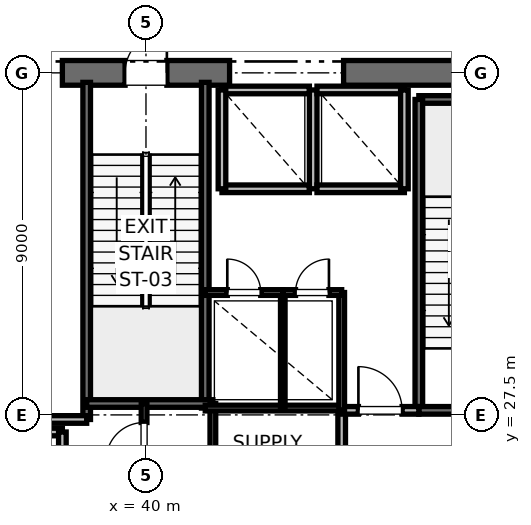
"""IFC4 building model, lengths in metres.
Left out: names, types, materials, properties, quantities, classifications, styles, units other than length and angle.
Written with IfcOpenShell. Run it as: python <this file> out.ifc"""

import sys

from ifc_helpers import new_model, si_unit, direction, frame, frame_2d, origin, place, context, subcontext, project, spatial, rectangle, extrude, element, fill, save


model = new_model("IFC4")
c1 = context("Model", 3, precision=1e-05, world=origin(), true_north=direction((0.0, 1.0)))
c2 = subcontext(c1, "Body", "Model", "MODEL_VIEW")
j1 = project(units=[si_unit("LENGTHUNIT", "METRE"), si_unit("PLANEANGLEUNIT", "RADIAN")], contexts=[c1])
p1 = place(None, origin())
s1 = spatial("IfcSite", under=j1, at=p1, CompositionType="ELEMENT")
p2 = place(p1, origin())
s2 = spatial("IfcBuilding", under=s1, at=p2, CompositionType="ELEMENT")
p3 = place(p2, frame((0.0, 0.0, 11.2)))
s3 = spatial("IfcBuildingStorey", under=s2, at=p3, CompositionType="ELEMENT", Elevation=11.2)
p4 = place(p3, frame((37.8, 36.5, 0.0), z_axis=(0.0, 0.0, 1.0), x_axis=(1.0, 0.0, 0.0)))
e1 = element("IfcWall", 1, at=p4, inside=s3, PredefinedType="SHEAR", context=c2, shape_type="SweptSolid", body=[
    extrude(rectangle(XDim=4.4, YDim=0.65, at=frame_2d((2.2, 0.0))), origin(), (0.0, 0.0, 1.0), 4.92),
])
p5 = place(p4, frame((1.65, 0.0, 0.0)))
e2 = element("IfcOpeningElement", 2, at=p5, cuts=e1, PredefinedType="OPENING", context=c2, shape_type="SweptSolid", body=[
    extrude(rectangle(XDim=1.1, YDim=2.15, at=frame_2d((0.55, 1.075))), frame((0.0, 0.325, 0.0), z_axis=(0.0, -1.0, 0.0), x_axis=(1.0, 0.0, 0.0)), (0.0, 0.0, 1.0), 0.65),
])
p6 = place(p3, frame((45.2, 36.5, 0.0), z_axis=(0.0, 0.0, 1.0), x_axis=(1.0, 0.0, 0.0)))
e3 = element("IfcWall", 3, at=p6, inside=s3, PredefinedType="SHEAR", context=c2, shape_type="SweptSolid", body=[
    extrude(rectangle(XDim=5.8, YDim=0.65, at=frame_2d((2.9, 0.0))), origin(), (0.0, 0.0, 1.0), 4.92),
])
p7 = place(p3, frame((47.18, 35.8, 0.0), z_axis=(0.0, 0.0, 1.0), x_axis=(1.0, 0.0, 0.0)))
e4 = element("IfcWall", 4, at=p7, inside=s3, PredefinedType="SOLIDWALL", context=c2, shape_type="SweptSolid", body=[
    extrude(rectangle(XDim=3.12, YDim=0.2, at=frame_2d((1.56, 0.0))), origin(), (0.0, 0.0, 1.0), 4.92),
])
p8 = place(p3, frame((47.18, 27.62, 0.0), z_axis=(0.0, 0.0, 1.0), x_axis=(0.0, 1.0, 0.0)))
e5 = element("IfcWall", 5, at=p8, inside=s3, PredefinedType="SOLIDWALL", context=c2, shape_type="SweptSolid", body=[
    extrude(rectangle(XDim=8.18, YDim=0.2, at=frame_2d((4.09, 0.0))), origin(), (0.0, 0.0, 1.0), 4.92),
])
p9 = place(p3, frame((47.18, 27.62, 0.0), z_axis=(0.0, 0.0, 1.0), x_axis=(1.0, 0.0, 0.0)))
e6 = element("IfcWall", 6, at=p9, inside=s3, PredefinedType="SOLIDWALL", context=c2, shape_type="SweptSolid", body=[
    extrude(rectangle(XDim=3.12, YDim=0.2, at=frame_2d((1.56, 0.0))), origin(), (0.0, 0.0, 1.0), 4.92),
])
p10 = place(p9, frame((1.01, 0.0, 0.0)))
e7 = element("IfcOpeningElement", 7, at=p10, cuts=e6, PredefinedType="OPENING", context=c2, shape_type="SweptSolid", body=[
    extrude(rectangle(XDim=1.1, YDim=2.15, at=frame_2d((0.55, 1.075))), frame((0.0, 0.1, 0.0), z_axis=(0.0, -1.0, 0.0), x_axis=(1.0, 0.0, 0.0)), (0.0, 0.0, 1.0), 0.2),
])
p11 = place(p3, frame((38.44, 27.38, 0.0), z_axis=(0.0, 0.0, 1.0), x_axis=(0.0, 1.0, 0.0)))
e8 = element("IfcWall", 8, at=p11, inside=s3, PredefinedType="SOLIDWALL", context=c2, shape_type="SweptSolid", body=[
    extrude(rectangle(XDim=8.87, YDim=0.2, at=frame_2d((4.435, 0.0))), origin(), (0.0, 0.0, 1.0), 4.92),
])
p12 = place(p3, frame((41.56, 27.68, 0.0), z_axis=(0.0, 0.0, 1.0), x_axis=(0.0, 1.0, 0.0)))
e9 = element("IfcWall", 9, at=p12, inside=s3, PredefinedType="SOLIDWALL", context=c2, shape_type="SweptSolid", body=[
    extrude(rectangle(XDim=8.57, YDim=0.2, at=frame_2d((4.285, 0.0))), origin(), (0.0, 0.0, 1.0), 4.92),
])
p13 = place(p3, frame((38.44, 27.8, 0.0), z_axis=(0.0, 0.0, 1.0), x_axis=(1.0, 0.0, 0.0)))
e10 = element("IfcWall", 10, at=p13, inside=s3, PredefinedType="SOLIDWALL", context=c2, shape_type="SweptSolid", body=[
    extrude(rectangle(XDim=3.32, YDim=0.2, at=frame_2d((1.66, 0.0))), origin(), (0.0, 0.0, 1.0), 4.92),
])
p14 = place(p3, frame((32.82, 27.38, 0.0), z_axis=(0.0, 0.0, 1.0), x_axis=(1.0, 0.0, 0.0)))
e11 = element("IfcWall", 11, at=p14, inside=s3, PredefinedType="PARTITIONING", context=c2, shape_type="SweptSolid", body=[
    extrude(rectangle(XDim=5.62, YDim=0.2, at=frame_2d((2.81, 0.0))), origin(), (0.0, 0.0, 1.0), 4.92),
])
p15 = place(p3, frame((45.15, 24.25, 0.0), z_axis=(0.0, 0.0, 1.0), x_axis=(0.0, 1.0, 0.0)))
e12 = element("IfcWall", 12, at=p15, inside=s3, PredefinedType="PARTITIONING", context=c2, shape_type="SweptSolid", body=[
    extrude(rectangle(XDim=3.37, YDim=0.2, at=frame_2d((1.685, 0.0))), origin(), (0.0, 0.0, 1.0), 4.92),
])
p16 = place(p3, frame((45.15, 27.62, 0.0), z_axis=(0.0, 0.0, 1.0), x_axis=(1.0, 0.0, 0.0)))
e13 = element("IfcWall", 13, at=p16, inside=s3, PredefinedType="PARTITIONING", context=c2, shape_type="SweptSolid", body=[
    extrude(rectangle(XDim=2.03, YDim=0.2, at=frame_2d((1.015, 0.0))), origin(), (0.0, 0.0, 1.0), 4.92),
])
p17 = place(p16, frame((0.44, 0.0, 0.0)))
e14 = element("IfcOpeningElement", 14, at=p17, cuts=e13, PredefinedType="OPENING", context=c2, shape_type="SweptSolid", body=[
    extrude(rectangle(XDim=1.15, YDim=2.2, at=frame_2d((0.575, 1.1))), frame((0.0, 0.1, 0.0), z_axis=(0.0, -1.0, 0.0), x_axis=(1.0, 0.0, 0.0)), (0.0, 0.0, 1.0), 0.2),
])
p18 = place(p3, frame((37.8, 27.05, 0.0), z_axis=(0.0, 0.0, 1.0), x_axis=(-1.0, 0.0, 0.0)))
e15 = element("IfcWall", 15, at=p18, inside=s3, PredefinedType="SOLIDWALL", context=c2, shape_type="SweptSolid", body=[
    extrude(rectangle(XDim=2.3, YDim=0.2, at=frame_2d((1.15, 0.0))), origin(), (0.0, 0.0, 1.0), 4.92),
])
p19 = place(p3, frame((37.8, 24.45, 0.0), z_axis=(0.0, 0.0, 1.0), x_axis=(0.0, 1.0, 0.0)))
e16 = element("IfcWall", 16, at=p19, inside=s3, PredefinedType="SOLIDWALL", context=c2, shape_type="SweptSolid", body=[
    extrude(rectangle(XDim=2.6, YDim=0.2, at=frame_2d((1.3, 0.0))), origin(), (0.0, 0.0, 1.0), 4.92),
])
p20 = place(p3, frame((42.0, 33.45, 0.0), z_axis=(0.0, 0.0, 1.0), x_axis=(1.0, 0.0, 0.0)))
e17 = element("IfcWall", 17, at=p20, inside=s3, PredefinedType="SOLIDWALL", context=c2, shape_type="SweptSolid", body=[
    extrude(rectangle(XDim=2.3, YDim=0.2, at=frame_2d((1.15, 0.0))), origin(), (0.0, 0.0, 1.0), 4.92),
])
p21 = place(p3, frame((44.3, 36.05, 0.0), z_axis=(0.0, 0.0, 1.0), x_axis=(-1.0, 0.0, 0.0)))
e18 = element("IfcWall", 18, at=p21, inside=s3, PredefinedType="SOLIDWALL", context=c2, shape_type="SweptSolid", body=[
    extrude(rectangle(XDim=2.3, YDim=0.2, at=frame_2d((1.15, 0.0))), origin(), (0.0, 0.0, 1.0), 3.7),
])
for number, where, z_axis, x_axis in (
    (19, (42.0, 36.05, 0.0), (0.0, 0.0, 1.0), (0.0, -1.0, 0.0)),
    (20, (44.4, 33.45, 0.0), (0.0, 0.0, 1.0), (0.0, 1.0, 0.0)),
):
    element("IfcWall", number, at=place(p3, frame(where, z_axis=z_axis, x_axis=x_axis)), inside=s3, PredefinedType="SOLIDWALL", context=c2, shape_type="SweptSolid", body=[
        extrude(rectangle(XDim=2.6, YDim=0.2, at=frame_2d((1.3, 0.0))), origin(), (0.0, 0.0, 1.0), 3.7),
    ])
p22 = place(p3, frame((44.5, 33.45, 0.0), z_axis=(0.0, 0.0, 1.0), x_axis=(1.0, 0.0, 0.0)))
e21 = element("IfcWall", 21, at=p22, inside=s3, PredefinedType="SOLIDWALL", context=c2, shape_type="SweptSolid", body=[
    extrude(rectangle(XDim=2.3, YDim=0.2, at=frame_2d((1.15, 0.0))), origin(), (0.0, 0.0, 1.0), 4.92),
])
p23 = place(p3, frame((46.8, 36.05, 0.0), z_axis=(0.0, 0.0, 1.0), x_axis=(-1.0, 0.0, 0.0)))
e22 = element("IfcWall", 22, at=p23, inside=s3, PredefinedType="SOLIDWALL", context=c2, shape_type="SweptSolid", body=[
    extrude(rectangle(XDim=2.3, YDim=0.2, at=frame_2d((1.15, 0.0))), origin(), (0.0, 0.0, 1.0), 3.7),
])
p24 = place(p3, frame((46.8, 33.45, 0.0), z_axis=(0.0, 0.0, 1.0), x_axis=(0.0, 1.0, 0.0)))
e23 = element("IfcWall", 23, at=p24, inside=s3, PredefinedType="SOLIDWALL", context=c2, shape_type="SweptSolid", body=[
    extrude(rectangle(XDim=2.6, YDim=0.2, at=frame_2d((1.3, 0.0))), origin(), (0.0, 0.0, 1.0), 4.92),
])
p25 = place(p3, frame((41.76, 23.8, 0.0), z_axis=(0.0, 0.0, 1.0), x_axis=(0.0, 1.0, 0.0)))
e24 = element("IfcWall", 24, at=p25, inside=s3, PredefinedType="PARTITIONING", context=c2, shape_type="SweptSolid", body=[
    extrude(rectangle(XDim=4.0, YDim=0.15, at=frame_2d((2.0, 0.0))), origin(), (0.0, 0.0, 1.0), 2.85),
])
p26 = place(p3, frame((39.95, 25.8, 0.0), z_axis=(0.0, 0.0, 1.0), x_axis=(0.0, 1.0, 0.0)))
e25 = element("IfcWall", 25, at=p26, inside=s3, PredefinedType="PARTITIONING", context=c2, shape_type="SweptSolid", body=[
    extrude(rectangle(XDim=2.0, YDim=0.15, at=frame_2d((1.0, 0.0))), origin(), (0.0, 0.0, 1.0), 2.85),
])
p27 = place(p26, frame((0.5, 0.0, 0.0)))
e26 = element("IfcOpeningElement", 26, at=p27, cuts=e25, PredefinedType="OPENING", context=c2, shape_type="SweptSolid", body=[
    extrude(rectangle(XDim=1.0, YDim=2.15, at=frame_2d((0.5, 1.075))), frame((0.0, 0.075, 0.0), z_axis=(0.0, -1.0, 0.0), x_axis=(1.0, 0.0, 0.0)), (0.0, 0.0, 1.0), 0.15),
])
p28 = place(p3, frame((41.56, 27.68, 0.0), z_axis=(0.0, 0.0, 1.0), x_axis=(1.0, 0.0, 0.0)))
e27 = element("IfcWall", 27, at=p28, inside=s3, PredefinedType="PARTITIONING", context=c2, shape_type="SweptSolid", body=[
    extrude(rectangle(XDim=3.59, YDim=0.15, at=frame_2d((1.795, 0.0))), origin(), (0.0, 0.0, 1.0), 2.85),
])
p29 = place(p3, frame((45.15, 27.62, 0.0), z_axis=(0.0, 0.0, 1.0), x_axis=(0.0, 1.0, 0.0)))
e28 = element("IfcWall", 28, at=p29, inside=s3, PredefinedType="PARTITIONING", context=c2, shape_type="SweptSolid", body=[
    extrude(rectangle(XDim=3.1, YDim=0.15, at=frame_2d((1.55, 0.0))), origin(), (0.0, 0.0, 1.0), 2.85),
])
p30 = place(p3, frame((43.6, 27.68, 0.0), z_axis=(0.0, 0.0, 1.0), x_axis=(0.0, 1.0, 0.0)))
e29 = element("IfcWall", 29, at=p30, inside=s3, PredefinedType="PARTITIONING", context=c2, shape_type="SweptSolid", body=[
    extrude(rectangle(XDim=3.04, YDim=0.12, at=frame_2d((1.52, 0.0))), origin(), (0.0, 0.0, 1.0), 2.85),
])
p31 = place(p3, frame((41.56, 30.72, 0.0), z_axis=(0.0, 0.0, 1.0), x_axis=(1.0, 0.0, 0.0)))
e30 = element("IfcWall", 30, at=p31, inside=s3, PredefinedType="PARTITIONING", context=c2, shape_type="SweptSolid", body=[
    extrude(rectangle(XDim=2.04, YDim=0.15, at=frame_2d((1.02, 0.0))), origin(), (0.0, 0.0, 1.0), 2.85),
])
p32 = place(p31, frame((0.58, 0.0, 0.0)))
e31 = element("IfcOpeningElement", 31, at=p32, cuts=e30, PredefinedType="OPENING", context=c2, shape_type="SweptSolid", body=[
    extrude(rectangle(XDim=0.88, YDim=2.1, at=frame_2d((0.44, 1.05))), frame((0.0, 0.075, 0.0), z_axis=(0.0, -1.0, 0.0), x_axis=(1.0, 0.0, 0.0)), (0.0, 0.0, 1.0), 0.15),
])
p33 = place(p3, frame((43.6, 30.72, 0.0), z_axis=(0.0, 0.0, 1.0), x_axis=(1.0, 0.0, 0.0)))
e32 = element("IfcWall", 32, at=p33, inside=s3, PredefinedType="PARTITIONING", context=c2, shape_type="SweptSolid", body=[
    extrude(rectangle(XDim=1.55, YDim=0.15, at=frame_2d((0.775, 0.0))), origin(), (0.0, 0.0, 1.0), 2.85),
])
p34 = place(p33, frame((0.335, 0.0, 0.0)))
e33 = element("IfcOpeningElement", 33, at=p34, cuts=e32, PredefinedType="OPENING", context=c2, shape_type="SweptSolid", body=[
    extrude(rectangle(XDim=0.88, YDim=2.1, at=frame_2d((0.44, 1.05))), frame((0.0, 0.075, 0.0), z_axis=(0.0, -1.0, 0.0), x_axis=(1.0, 0.0, 0.0)), (0.0, 0.0, 1.0), 0.15),
])
p35 = place(p5, origin())
e34 = element("IfcDoor", 34, at=p35, inside=s3, OperationType="SINGLE_SWING_RIGHT", PredefinedType="DOOR", context=c2, shape_type="SweptSolid", body=[
    extrude(rectangle(XDim=1.1, YDim=2.15, at=frame_2d((0.55, 1.075))), frame((0.0, 0.025, 0.0), z_axis=(0.0, -1.0, 0.0), x_axis=(1.0, 0.0, 0.0)), (0.0, 0.0, 1.0), 0.05),
])
fill(e2, e34)
p36 = place(p17, origin())
e35 = element("IfcDoor", 35, at=p36, inside=s3, OperationType="SINGLE_SWING_LEFT", PredefinedType="DOOR", context=c2, shape_type="SweptSolid", body=[
    extrude(rectangle(XDim=1.15, YDim=2.2, at=frame_2d((0.575, 1.1))), frame((0.0, 0.025, 0.0), z_axis=(0.0, -1.0, 0.0), x_axis=(1.0, 0.0, 0.0)), (0.0, 0.0, 1.0), 0.05),
])
fill(e14, e35)
p37 = place(p27, origin())
e36 = element("IfcDoor", 36, at=p37, inside=s3, OperationType="SINGLE_SWING_LEFT", PredefinedType="DOOR", context=c2, shape_type="SweptSolid", body=[
    extrude(rectangle(XDim=1.0, YDim=2.15, at=frame_2d((0.5, 1.075))), frame((0.0, 0.025, 0.0), z_axis=(0.0, -1.0, 0.0), x_axis=(1.0, 0.0, 0.0)), (0.0, 0.0, 1.0), 0.05),
])
fill(e26, e36)
p38 = place(p32, origin())
e37 = element("IfcDoor", 37, at=p38, inside=s3, OperationType="SINGLE_SWING_LEFT", PredefinedType="DOOR", context=c2, shape_type="SweptSolid", body=[
    extrude(rectangle(XDim=0.88, YDim=2.1, at=frame_2d((0.44, 1.05))), frame((0.0, 0.025, 0.0), z_axis=(0.0, -1.0, 0.0), x_axis=(1.0, 0.0, 0.0)), (0.0, 0.0, 1.0), 0.05),
])
fill(e31, e37)
p39 = place(p34, origin())
e38 = element("IfcDoor", 38, at=p39, inside=s3, OperationType="SINGLE_SWING_RIGHT", PredefinedType="DOOR", context=c2, shape_type="SweptSolid", body=[
    extrude(rectangle(XDim=0.88, YDim=2.1, at=frame_2d((0.44, 1.05))), frame((0.0, 0.025, 0.0), z_axis=(0.0, -1.0, 0.0), x_axis=(1.0, 0.0, 0.0)), (0.0, 0.0, 1.0), 0.05),
])
fill(e33, e38)
save(model, sys.argv[1])
